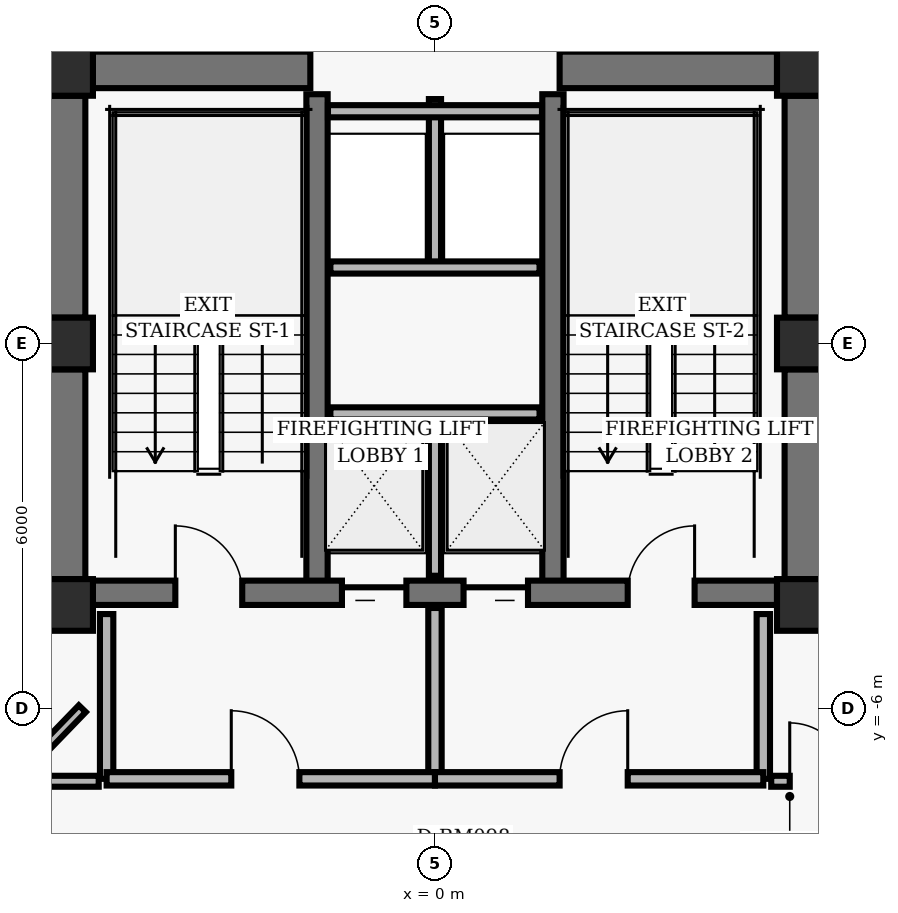
"""IFC4 building model, lengths in metres.
Left out: names, types, materials, properties, quantities, classifications, styles, units other than length and angle.
Written with IfcOpenShell. Run it as: python <this file> out.ifc"""

import sys

from ifc_helpers import new_model, si_unit, direction, frame, frame_2d, origin, origin_2d, place, context, subcontext, project, spatial, rectangle, hollow_rectangle, extrude, element, fill, save


model = new_model("IFC4")
c1 = context("Model", 3, precision=1e-05, world=origin(), true_north=direction((0.0, 1.0)))
c2 = subcontext(c1, "Body", "Model", "MODEL_VIEW")
j1 = project(units=[si_unit("LENGTHUNIT", "METRE"), si_unit("PLANEANGLEUNIT", "RADIAN")], contexts=[c1])
p1 = place(None, origin())
s1 = spatial("IfcSite", under=j1, at=p1, CompositionType="ELEMENT")
p2 = place(p1, origin())
s2 = spatial("IfcBuilding", under=s1, at=p2, CompositionType="ELEMENT")
p3 = place(p2, frame((0.0, 0.0, 122.88)))
s3 = spatial("IfcBuildingStorey", under=s2, at=p3, CompositionType="ELEMENT", Elevation=122.88)
for number, where, z_axis, x_axis in (
    (1, (-6.05, 4.5, 0.0), (0.0, 0.0, 1.0), (1.0, 0.0, 0.0)),
    (2, (6.05, 4.5, 0.0), (0.0, 0.0, 1.0), (1.0, 0.0, 0.0)),
    (3, (-6.05, 0.0, 0.0), (0.0, 0.0, 1.0), (1.0, 0.0, 0.0)),
    (4, (6.05, 0.0, 0.0), (0.0, 0.0, 1.0), (1.0, 0.0, 0.0)),
    (5, (-6.05, -4.3, 0.0), (0.0, 0.0, 1.0), (1.0, 0.0, 0.0)),
    (6, (6.05, -4.3, 0.0), (0.0, 0.0, 1.0), (1.0, 0.0, 0.0)),
):
    element("IfcColumn", number, at=place(p3, frame(where, z_axis=z_axis, x_axis=x_axis)), inside=s3, PredefinedType="COLUMN", context=c2, shape_type="SweptSolid", body=[
        extrude(hollow_rectangle(XDim=0.85, YDim=0.85, WallThickness=0.055, InnerFilletRadius=0.02, OuterFilletRadius=0.04, at=origin_2d()), origin(), (0.0, 0.0, 1.0), 3.04),
    ])
p4 = place(p3, frame((-6.05, 0.425, 0.0), z_axis=(0.0, 0.0, 1.0), x_axis=(0.0, 1.0, 0.0)))
e7 = element("IfcWall", 7, at=p4, inside=s3, PredefinedType="SHEAR", context=c2, shape_type="SweptSolid", body=[
    extrude(rectangle(XDim=3.65, YDim=0.6, at=frame_2d((1.825, 0.0))), origin(), (0.0, 0.0, 1.0), 2.618),
])
p5 = place(p3, frame((-6.05, -3.875, 0.0), z_axis=(0.0, 0.0, 1.0), x_axis=(0.0, 1.0, 0.0)))
e8 = element("IfcWall", 8, at=p5, inside=s3, PredefinedType="SHEAR", context=c2, shape_type="SweptSolid", body=[
    extrude(rectangle(XDim=3.45, YDim=0.6, at=frame_2d((1.725, 0.0))), origin(), (0.0, 0.0, 1.0), 2.618),
])
p6 = place(p3, frame((6.05, 0.425, 0.0), z_axis=(0.0, 0.0, 1.0), x_axis=(0.0, 1.0, 0.0)))
e9 = element("IfcWall", 9, at=p6, inside=s3, PredefinedType="SHEAR", context=c2, shape_type="SweptSolid", body=[
    extrude(rectangle(XDim=3.65, YDim=0.6, at=frame_2d((1.825, 0.0))), origin(), (0.0, 0.0, 1.0), 2.618),
])
p7 = place(p3, frame((6.05, -3.875, 0.0), z_axis=(0.0, 0.0, 1.0), x_axis=(0.0, 1.0, 0.0)))
e10 = element("IfcWall", 10, at=p7, inside=s3, PredefinedType="SHEAR", context=c2, shape_type="SweptSolid", body=[
    extrude(rectangle(XDim=3.45, YDim=0.6, at=frame_2d((1.725, 0.0))), origin(), (0.0, 0.0, 1.0), 2.618),
])
for number, where, z_axis, x_axis in (
    (11, (-1.94, -4.1, 0.0), (0.0, 0.0, 1.0), (0.0, 1.0, 0.0)),
    (12, (1.94, -4.1, 0.0), (0.0, 0.0, 1.0), (0.0, 1.0, 0.0)),
):
    element("IfcWall", number, at=place(p3, frame(where, z_axis=z_axis, x_axis=x_axis)), inside=s3, PredefinedType="SHEAR", context=c2, shape_type="SweptSolid", body=[
        extrude(rectangle(XDim=8.2, YDim=0.35, at=frame_2d((4.1, 0.0))), origin(), (0.0, 0.0, 1.0), 2.618),
    ])
p8 = place(p3, frame((-5.625, -4.1, 0.0), z_axis=(0.0, 0.0, 1.0), x_axis=(1.0, 0.0, 0.0)))
e13 = element("IfcWall", 13, at=p8, inside=s3, PredefinedType="SHEAR", context=c2, shape_type="SweptSolid", body=[
    extrude(rectangle(XDim=11.25, YDim=0.4, at=frame_2d((5.625, 0.0))), origin(), (0.0, 0.0, 1.0), 2.618),
])
p9 = place(p8, frame((1.355, 0.0, 0.0)))
e14 = element("IfcOpeningElement", 14, at=p9, cuts=e13, PredefinedType="OPENING", context=c2, shape_type="SweptSolid", body=[
    extrude(rectangle(XDim=1.1, YDim=2.04, at=frame_2d((0.55, 1.02))), frame((0.0, 0.21, 0.0), z_axis=(0.0, -1.0, 0.0), x_axis=(1.0, 0.0, 0.0)), (0.0, 0.0, 1.0), 0.42),
])
p10 = place(p8, frame((8.795, 0.0, 0.0)))
e15 = element("IfcOpeningElement", 15, at=p10, cuts=e13, PredefinedType="OPENING", context=c2, shape_type="SweptSolid", body=[
    extrude(rectangle(XDim=1.1, YDim=2.04, at=frame_2d((0.55, 1.02))), frame((0.0, 0.21, 0.0), z_axis=(0.0, -1.0, 0.0), x_axis=(1.0, 0.0, 0.0)), (0.0, 0.0, 1.0), 0.42),
])
p11 = place(p8, frame((4.095, 0.0, 0.0)))
e16 = element("IfcOpeningElement", 16, at=p11, cuts=e13, PredefinedType="OPENING", context=c2, shape_type="SweptSolid", body=[
    extrude(rectangle(XDim=1.06, YDim=2.04, at=frame_2d((0.53, 1.02))), frame((0.0, 0.21, 0.0), z_axis=(0.0, -1.0, 0.0), x_axis=(1.0, 0.0, 0.0)), (0.0, 0.0, 1.0), 0.42),
])
p12 = place(p8, frame((6.095, 0.0, 0.0)))
e17 = element("IfcOpeningElement", 17, at=p12, cuts=e13, PredefinedType="OPENING", context=c2, shape_type="SweptSolid", body=[
    extrude(rectangle(XDim=1.06, YDim=2.04, at=frame_2d((0.53, 1.02))), frame((0.0, 0.21, 0.0), z_axis=(0.0, -1.0, 0.0), x_axis=(1.0, 0.0, 0.0)), (0.0, 0.0, 1.0), 0.42),
])
for number, where, z_axis, x_axis in (
    (18, (-5.625, 4.5, 0.0), (0.0, 0.0, 1.0), (1.0, 0.0, 0.0)),
    (19, (2.05, 4.5, 0.0), (0.0, 0.0, 1.0), (1.0, 0.0, 0.0)),
):
    element("IfcWall", number, at=place(p3, frame(where, z_axis=z_axis, x_axis=x_axis)), inside=s3, PredefinedType="SHEAR", context=c2, shape_type="SweptSolid", body=[
        extrude(rectangle(XDim=3.575, YDim=0.6, at=frame_2d((1.788, 0.0))), origin(), (0.0, 0.0, 1.0), 2.618),
    ])
p13 = place(p3, frame((0.0, -3.82, 0.0), z_axis=(0.0, 0.0, 1.0), x_axis=(0.0, 1.0, 0.0)))
e20 = element("IfcWall", 20, at=p13, inside=s3, PredefinedType="PARTITIONING", context=c2, shape_type="SweptSolid", body=[
    extrude(rectangle(XDim=2.67, YDim=0.2, at=frame_2d((1.335, 0.0))), origin(), (0.0, 0.0, 1.0), 2.593),
])
p14 = place(p3, frame((-1.72, -1.15, 0.0), z_axis=(0.0, 0.0, 1.0), x_axis=(1.0, 0.0, 0.0)))
e21 = element("IfcWall", 21, at=p14, inside=s3, PredefinedType="PARTITIONING", context=c2, shape_type="SweptSolid", body=[
    extrude(rectangle(XDim=3.44, YDim=0.2, at=frame_2d((1.72, 0.0))), origin(), (0.0, 0.0, 1.0), 2.593),
])
for number, where, z_axis, x_axis in (
    (22, (-5.4, -7.16, 0.0), (0.0, 0.0, 1.0), (0.0, 1.0, 0.0)),
    (23, (5.4, -7.16, 0.0), (0.0, 0.0, 1.0), (0.0, 1.0, 0.0)),
):
    element("IfcWall", number, at=place(p3, frame(where, z_axis=z_axis, x_axis=x_axis)), inside=s3, PredefinedType="PARTITIONING", context=c2, shape_type="SweptSolid", body=[
        extrude(rectangle(XDim=2.71, YDim=0.22, at=frame_2d((1.355, 0.0))), origin(), (0.0, 0.0, 1.0), 2.593),
    ])
p15 = place(p3, frame((0.0, -7.16, 0.0), z_axis=(0.0, 0.0, 1.0), x_axis=(0.0, 1.0, 0.0)))
e24 = element("IfcWall", 24, at=p15, inside=s3, PredefinedType="PARTITIONING", context=c2, shape_type="SweptSolid", body=[
    extrude(rectangle(XDim=2.81, YDim=0.22, at=frame_2d((1.405, 0.0))), origin(), (0.0, 0.0, 1.0), 2.593),
])
p16 = place(p3, frame((-5.4, -7.16, 0.0), z_axis=(0.0, 0.0, 1.0), x_axis=(1.0, 0.0, 0.0)))
e25 = element("IfcWall", 25, at=p16, inside=s3, PredefinedType="PARTITIONING", context=c2, shape_type="SweptSolid", body=[
    extrude(rectangle(XDim=5.4, YDim=0.22, at=frame_2d((2.7, 0.0))), origin(), (0.0, 0.0, 1.0), 2.16),
])
p17 = place(p16, frame((2.05, 0.0, 0.0)))
e26 = element("IfcOpeningElement", 26, at=p17, cuts=e25, PredefinedType="OPENING", context=c2, shape_type="SweptSolid", body=[
    extrude(rectangle(XDim=1.12, YDim=2.02, at=frame_2d((0.56, 1.01))), frame((0.0, 0.12, 0.0), z_axis=(0.0, -1.0, 0.0), x_axis=(1.0, 0.0, 0.0)), (0.0, 0.0, 1.0), 0.24),
])
p18 = place(p3, frame((0.0, -7.16, 0.0), z_axis=(0.0, 0.0, 1.0), x_axis=(1.0, 0.0, 0.0)))
e27 = element("IfcWall", 27, at=p18, inside=s3, PredefinedType="PARTITIONING", context=c2, shape_type="SweptSolid", body=[
    extrude(rectangle(XDim=5.4, YDim=0.22, at=frame_2d((2.7, 0.0))), origin(), (0.0, 0.0, 1.0), 2.16),
])
p19 = place(p18, frame((2.05, 0.0, 0.0)))
e28 = element("IfcOpeningElement", 28, at=p19, cuts=e27, PredefinedType="OPENING", context=c2, shape_type="SweptSolid", body=[
    extrude(rectangle(XDim=1.12, YDim=2.02, at=frame_2d((0.56, 1.01))), frame((0.0, 0.12, 0.0), z_axis=(0.0, -1.0, 0.0), x_axis=(1.0, 0.0, 0.0)), (0.0, 0.0, 1.0), 0.24),
])
p20 = place(p3, frame((0.0, 1.25, 0.0), z_axis=(0.0, 0.0, 1.0), x_axis=(0.0, 1.0, 0.0)))
e29 = element("IfcWall", 29, at=p20, inside=s3, PredefinedType="PARTITIONING", context=c2, shape_type="SweptSolid", body=[
    extrude(rectangle(XDim=2.77, YDim=0.2, at=frame_2d((1.385, 0.0))), origin(), (0.0, 0.0, 1.0), 2.593),
])
p21 = place(p3, frame((-1.72, 1.25, 0.0), z_axis=(0.0, 0.0, 1.0), x_axis=(1.0, 0.0, 0.0)))
e30 = element("IfcWall", 30, at=p21, inside=s3, PredefinedType="PARTITIONING", context=c2, shape_type="SweptSolid", body=[
    extrude(rectangle(XDim=3.44, YDim=0.2, at=frame_2d((1.72, 0.0))), origin(), (0.0, 0.0, 1.0), 2.593),
])
p22 = place(p3, frame((-1.76, 3.82, 0.0), z_axis=(0.0, 0.0, 1.0), x_axis=(1.0, 0.0, 0.0)))
e31 = element("IfcWall", 31, at=p22, inside=s3, PredefinedType="PARTITIONING", context=c2, shape_type="SweptSolid", body=[
    extrude(rectangle(XDim=3.52, YDim=0.2, at=frame_2d((1.76, 0.0))), origin(), (0.0, 0.0, 1.0), 2.593),
])
p23 = place(p3, frame((5.53, -7.2, 0.0), z_axis=(0.0, 0.0, 1.0), x_axis=(1.0, 0.0, 0.0)))
e32 = element("IfcWall", 32, at=p23, inside=s3, PredefinedType="PARTITIONING", context=c2, shape_type="SweptSolid", body=[
    extrude(rectangle(XDim=5.52, YDim=0.18, at=frame_2d((2.76, 0.0))), origin(), (0.0, 0.0, 1.0), 2.16),
])
p24 = place(p23, frame((0.305, 0.0, 0.0)))
e33 = element("IfcOpeningElement", 33, at=p24, cuts=e32, PredefinedType="OPENING", context=c2, shape_type="SweptSolid", body=[
    extrude(rectangle(XDim=0.96, YDim=2.02, at=frame_2d((0.48, 1.01))), frame((0.0, 0.1, 0.0), z_axis=(0.0, -1.0, 0.0), x_axis=(1.0, 0.0, 0.0)), (0.0, 0.0, 1.0), 0.2),
])
p25 = place(p3, frame((-6.59, -7.2, 0.0), z_axis=(0.0, 0.0, 1.0), x_axis=(1.0, 0.0, 0.0)))
e34 = element("IfcWall", 34, at=p25, inside=s3, PredefinedType="PARTITIONING", context=c2, shape_type="SweptSolid", body=[
    extrude(rectangle(XDim=1.06, YDim=0.18, at=frame_2d((0.53, 0.0))), origin(), (0.0, 0.0, 1.0), 2.16),
])
p26 = place(p3, frame((-5.8, -6.006, 0.0), z_axis=(0.0, 0.0, 1.0), x_axis=(-0.694550575615, -0.719443881003, 0.0)))
e35 = element("IfcWall", 35, at=p26, inside=s3, PredefinedType="PARTITIONING", context=c2, shape_type="SweptSolid", body=[
    extrude(rectangle(XDim=0.893, YDim=0.16, at=frame_2d((0.446, 0.0))), origin(), (0.0, 0.0, 1.0), 2.593),
])
p27 = place(p9, origin())
e36 = element("IfcDoor", 36, at=p27, inside=s3, OperationType="SINGLE_SWING_LEFT", PredefinedType="DOOR", context=c2, shape_type="SweptSolid", body=[
    extrude(rectangle(XDim=1.1, YDim=2.04, at=frame_2d((0.55, 1.02))), frame((0.0, 0.025, 0.0), z_axis=(0.0, -1.0, 0.0), x_axis=(1.0, 0.0, 0.0)), (0.0, 0.0, 1.0), 0.05),
])
fill(e14, e36)
p28 = place(p10, origin())
e37 = element("IfcDoor", 37, at=p28, inside=s3, OperationType="SINGLE_SWING_RIGHT", PredefinedType="DOOR", context=c2, shape_type="SweptSolid", body=[
    extrude(rectangle(XDim=1.1, YDim=2.04, at=frame_2d((0.55, 1.02))), frame((0.0, 0.025, 0.0), z_axis=(0.0, -1.0, 0.0), x_axis=(1.0, 0.0, 0.0)), (0.0, 0.0, 1.0), 0.05),
])
fill(e15, e37)
p29 = place(p11, origin())
e38 = element("IfcDoor", 38, at=p29, inside=s3, OperationType="SLIDING_TO_LEFT", PredefinedType="DOOR", context=c2, shape_type="SweptSolid", body=[
    extrude(rectangle(XDim=1.06, YDim=2.04, at=frame_2d((0.53, 1.02))), frame((0.0, 0.025, 0.0), z_axis=(0.0, -1.0, 0.0), x_axis=(1.0, 0.0, 0.0)), (0.0, 0.0, 1.0), 0.05),
])
fill(e16, e38)
p30 = place(p12, origin())
e39 = element("IfcDoor", 39, at=p30, inside=s3, OperationType="SLIDING_TO_RIGHT", PredefinedType="DOOR", context=c2, shape_type="SweptSolid", body=[
    extrude(rectangle(XDim=1.06, YDim=2.04, at=frame_2d((0.53, 1.02))), frame((0.0, 0.025, 0.0), z_axis=(0.0, -1.0, 0.0), x_axis=(1.0, 0.0, 0.0)), (0.0, 0.0, 1.0), 0.05),
])
fill(e17, e39)
p31 = place(p17, origin())
e40 = element("IfcDoor", 40, at=p31, inside=s3, OperationType="SINGLE_SWING_LEFT", PredefinedType="DOOR", context=c2, shape_type="SweptSolid", body=[
    extrude(rectangle(XDim=1.12, YDim=2.02, at=frame_2d((0.56, 1.01))), frame((0.0, 0.025, 0.0), z_axis=(0.0, -1.0, 0.0), x_axis=(1.0, 0.0, 0.0)), (0.0, 0.0, 1.0), 0.05),
])
fill(e26, e40)
p32 = place(p19, origin())
e41 = element("IfcDoor", 41, at=p32, inside=s3, OperationType="SINGLE_SWING_RIGHT", PredefinedType="DOOR", context=c2, shape_type="SweptSolid", body=[
    extrude(rectangle(XDim=1.12, YDim=2.02, at=frame_2d((0.56, 1.01))), frame((0.0, 0.025, 0.0), z_axis=(0.0, -1.0, 0.0), x_axis=(1.0, 0.0, 0.0)), (0.0, 0.0, 1.0), 0.05),
])
fill(e28, e41)
p33 = place(p24, origin())
e42 = element("IfcDoor", 42, at=p33, inside=s3, OperationType="SINGLE_SWING_LEFT", PredefinedType="DOOR", context=c2, shape_type="SweptSolid", body=[
    extrude(rectangle(XDim=0.96, YDim=2.02, at=frame_2d((0.48, 1.01))), frame((0.0, 0.025, 0.0), z_axis=(0.0, -1.0, 0.0), x_axis=(1.0, 0.0, 0.0)), (0.0, 0.0, 1.0), 0.05),
])
fill(e33, e42)
save(model, sys.argv[1])
